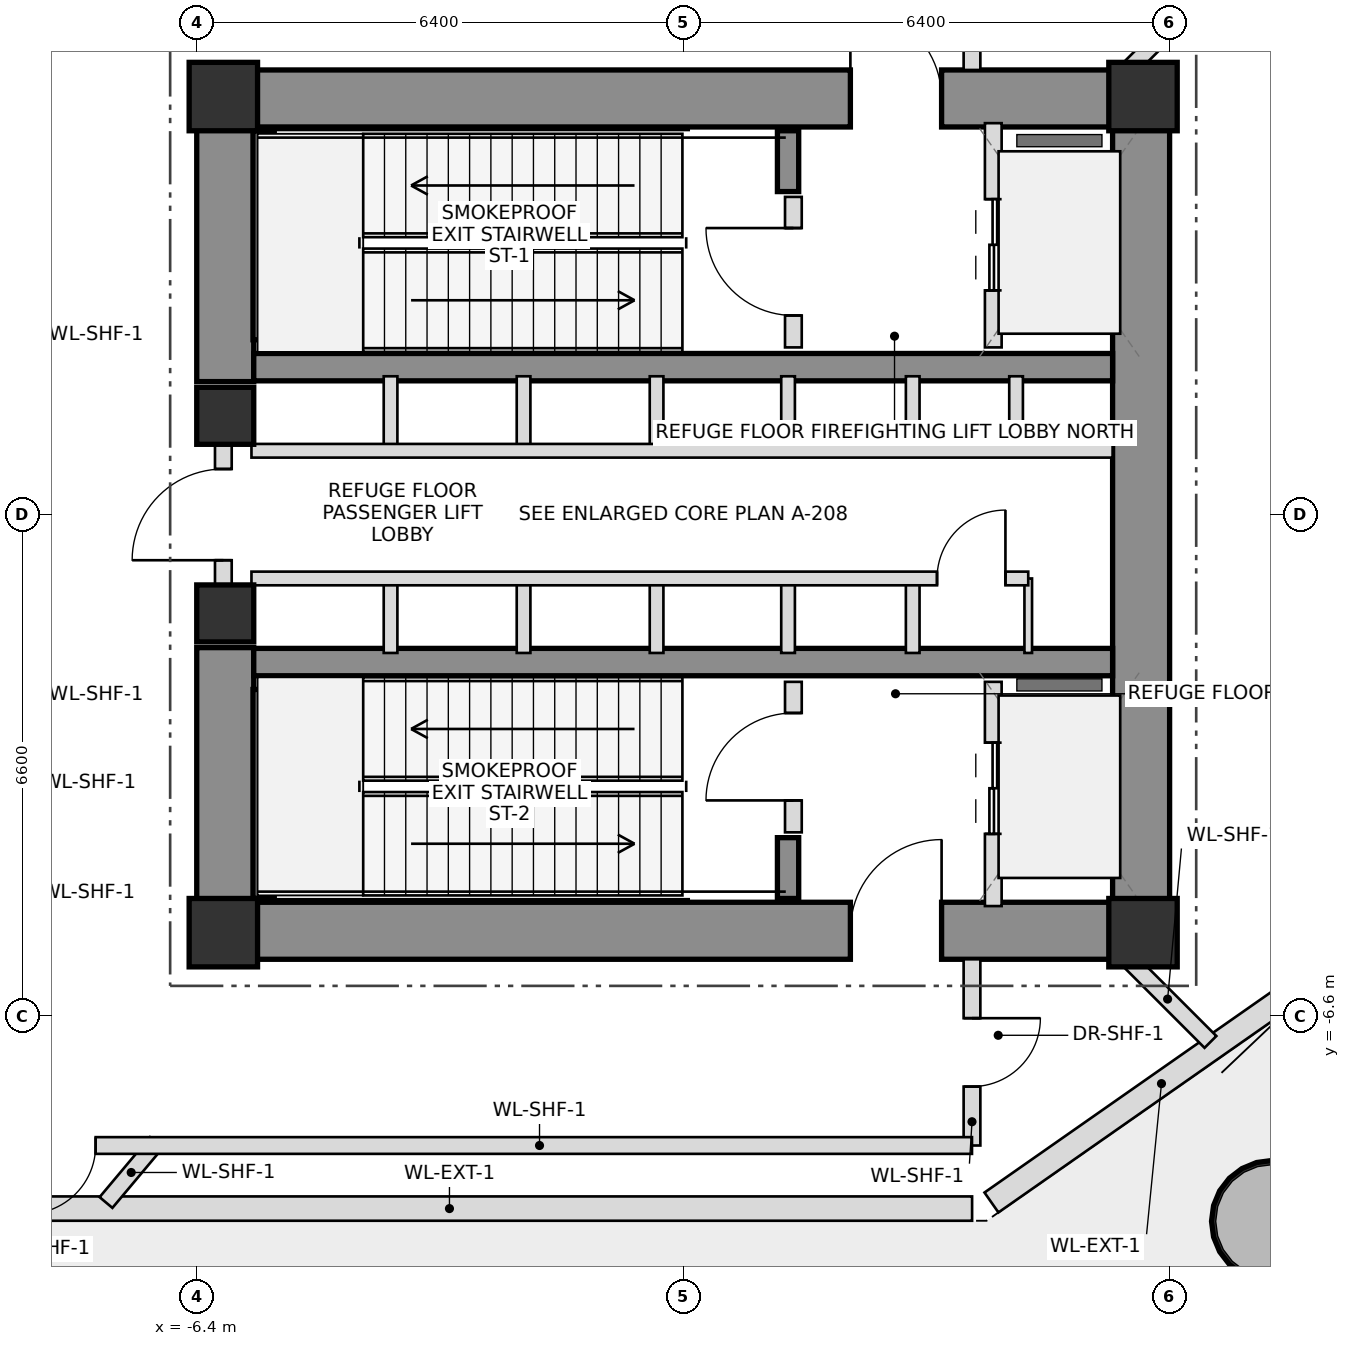
"""IFC4 building model, lengths in metres.
Left out: names, types, materials, properties, quantities, classifications, styles, units other than length and angle.
Written with IfcOpenShell. Run it as: python <this file> out.ifc"""

import sys

from ifc_helpers import new_model, si_unit, direction, frame, frame_2d, origin, origin_2d, place, context, subcontext, project, spatial, rectangle, hollow_circle, extrude, source, transform, mapped, element, fill, save


model = new_model("IFC4")
c1 = context("Model", 3, precision=1e-05, world=origin(), true_north=direction((0.0, 1.0)))
c2 = subcontext(c1, "Body", "Model", "MODEL_VIEW")
j1 = project(units=[si_unit("LENGTHUNIT", "METRE"), si_unit("PLANEANGLEUNIT", "RADIAN")], contexts=[c1])
p1 = place(None, origin())
s1 = spatial("IfcSite", under=j1, at=p1, CompositionType="ELEMENT")
p2 = place(p1, origin())
s2 = spatial("IfcBuilding", under=s1, at=p2, CompositionType="ELEMENT")
p3 = place(p2, frame((0.0, 0.0, 84.8)))
s3 = spatial("IfcBuildingStorey", under=s2, at=p3, CompositionType="ELEMENT", Elevation=84.8)
m1 = source(origin(), c2, "Body", "SweptSolid", [
    extrude(rectangle(XDim=0.9, YDim=0.9, at=origin_2d()), origin(), (0.0, 0.0, 1.0), 5.1),
])
for number, where, z_axis, x_axis in (
    (1, (-6.05, -5.5, 0.0), (0.0, 0.0, 1.0), (1.0, 0.0, 0.0)),
    (2, (6.05, -5.5, 0.0), (0.0, 0.0, 1.0), (1.0, 0.0, 0.0)),
    (3, (6.05, 5.5, 0.0), (0.0, 0.0, 1.0), (1.0, 0.0, 0.0)),
    (4, (-6.05, 5.5, 0.0), (0.0, 0.0, 1.0), (1.0, 0.0, 0.0)),
):
    element("IfcColumn", number, at=place(p3, frame(where, z_axis=z_axis, x_axis=x_axis)), inside=s3, PredefinedType="COLUMN", context=c2, shape_type="MappedRepresentation", body=[
        mapped(m1, transform((0.0, 0.0, 0.0), scale=1.0)),
    ])
p4 = place(p3, frame((-6.4, 5.475, 0.0), z_axis=(0.0, 0.0, 1.0), x_axis=(1.0, 0.0, 0.0)))
e5 = element("IfcWall", 5, at=p4, inside=s3, PredefinedType="SHEAR", context=c2, shape_type="SweptSolid", body=[
    extrude(rectangle(XDim=12.8, YDim=0.75, at=frame_2d((6.4, 0.0))), origin(), (0.0, 0.0, 1.0), 5.1),
])
p5 = place(p4, frame((8.6, 0.0, 0.0)))
e6 = element("IfcOpeningElement", 6, at=p5, cuts=e5, PredefinedType="OPENING", context=c2, shape_type="SweptSolid", body=[
    extrude(rectangle(XDim=1.2, YDim=2.2, at=frame_2d((0.6, 1.1))), frame((0.0, 0.385, 0.0), z_axis=(0.0, -1.0, 0.0), x_axis=(1.0, 0.0, 0.0)), (0.0, 0.0, 1.0), 0.77),
])
p6 = place(p3, frame((-6.4, -5.475, 0.0), z_axis=(0.0, 0.0, 1.0), x_axis=(1.0, 0.0, 0.0)))
e7 = element("IfcWall", 7, at=p6, inside=s3, PredefinedType="SHEAR", context=c2, shape_type="SweptSolid", body=[
    extrude(rectangle(XDim=12.8, YDim=0.75, at=frame_2d((6.4, 0.0))), origin(), (0.0, 0.0, 1.0), 5.1),
])
p7 = place(p6, frame((8.6, 0.0, 0.0)))
e8 = element("IfcOpeningElement", 8, at=p7, cuts=e7, PredefinedType="OPENING", context=c2, shape_type="SweptSolid", body=[
    extrude(rectangle(XDim=1.2, YDim=2.2, at=frame_2d((0.6, 1.1))), frame((0.0, 0.385, 0.0), z_axis=(0.0, -1.0, 0.0), x_axis=(1.0, 0.0, 0.0)), (0.0, 0.0, 1.0), 0.77),
])
p8 = place(p3, frame((6.025, -5.1, 0.0), z_axis=(0.0, 0.0, 1.0), x_axis=(0.0, 1.0, 0.0)))
e9 = element("IfcWall", 9, at=p8, inside=s3, PredefinedType="SHEAR", context=c2, shape_type="SweptSolid", body=[
    extrude(rectangle(XDim=10.2, YDim=0.75, at=frame_2d((5.1, 0.0))), origin(), (0.0, 0.0, 1.0), 5.1),
])
for number, where, z_axis, x_axis in (
    (10, (-6.025, -5.1, 0.0), (0.0, 0.0, 1.0), (0.0, 1.0, 0.0)),
    (11, (-6.025, 1.75, 0.0), (0.0, 0.0, 1.0), (0.0, 1.0, 0.0)),
):
    element("IfcWall", number, at=place(p3, frame(where, z_axis=z_axis, x_axis=x_axis)), inside=s3, PredefinedType="SHEAR", context=c2, shape_type="SweptSolid", body=[
        extrude(rectangle(XDim=3.35, YDim=0.75, at=frame_2d((1.675, 0.0))), origin(), (0.0, 0.0, 1.0), 5.1),
    ])
for number, where, z_axis, x_axis in (
    (12, (-5.65, 1.94, 0.0), (0.0, 0.0, 1.0), (1.0, 0.0, 0.0)),
    (13, (-5.65, -1.94, 0.0), (0.0, 0.0, 1.0), (1.0, 0.0, 0.0)),
):
    element("IfcWall", number, at=place(p3, frame(where, z_axis=z_axis, x_axis=x_axis)), inside=s3, PredefinedType="SHEAR", context=c2, shape_type="SweptSolid", body=[
        extrude(rectangle(XDim=11.3, YDim=0.36, at=frame_2d((5.65, 0.0))), origin(), (0.0, 0.0, 1.0), 5.1),
    ])
p9 = place(p3, frame((-5.52, 2.3, 0.0), z_axis=(0.0, 0.0, 1.0), x_axis=(0.0, 1.0, 0.0)))
e14 = element("IfcWall", 14, at=p9, inside=s3, PredefinedType="SHEAR", context=c2, shape_type="SweptSolid", body=[
    extrude(rectangle(XDim=2.75, YDim=0.28, at=frame_2d((1.375, 0.0))), origin(), (0.0, 0.0, 1.0), 5.1),
])
p10 = place(p3, frame((1.38, 4.25, 0.0), z_axis=(0.0, 0.0, 1.0), x_axis=(0.0, 1.0, 0.0)))
e15 = element("IfcWall", 15, at=p10, inside=s3, PredefinedType="SHEAR", context=c2, shape_type="SweptSolid", body=[
    extrude(rectangle(XDim=0.8, YDim=0.28, at=frame_2d((0.4, 0.0))), origin(), (0.0, 0.0, 1.0), 5.1),
])
p11 = place(p3, frame((-5.52, -5.05, 0.0), z_axis=(0.0, 0.0, 1.0), x_axis=(0.0, 1.0, 0.0)))
e16 = element("IfcWall", 16, at=p11, inside=s3, PredefinedType="SHEAR", context=c2, shape_type="SweptSolid", body=[
    extrude(rectangle(XDim=2.75, YDim=0.28, at=frame_2d((1.375, 0.0))), origin(), (0.0, 0.0, 1.0), 5.1),
])
p12 = place(p3, frame((1.38, -5.05, 0.0), z_axis=(0.0, 0.0, 1.0), x_axis=(0.0, 1.0, 0.0)))
e17 = element("IfcWall", 17, at=p12, inside=s3, PredefinedType="SHEAR", context=c2, shape_type="SweptSolid", body=[
    extrude(rectangle(XDim=0.8, YDim=0.28, at=frame_2d((0.4, 0.0))), origin(), (0.0, 0.0, 1.0), 5.1),
])
m2 = source(origin(), c2, "Body", "SweptSolid", [
    extrude(rectangle(XDim=0.75, YDim=0.75, at=origin_2d()), origin(), (0.0, 0.0, 1.0), 5.1),
])
for number, where, z_axis, x_axis in (
    (18, (-6.025, -1.3, 0.0), (0.0, 0.0, 1.0), (1.0, 0.0, 0.0)),
    (19, (-6.025, 1.3, 0.0), (0.0, 0.0, 1.0), (1.0, 0.0, 0.0)),
):
    element("IfcColumn", number, at=place(p3, frame(where, z_axis=z_axis, x_axis=x_axis)), inside=s3, PredefinedType="COLUMN", context=c2, shape_type="MappedRepresentation", body=[
        mapped(m2, transform((0.0, 0.0, 0.0), scale=1.0)),
    ])
m3 = source(origin(), c2, "Body", "SweptSolid", [
    extrude(hollow_circle(Radius=0.8, WallThickness=0.055, at=origin_2d()), origin(), (0.0, 0.0, 1.0), 5.0),
])
p13 = place(p3, frame((7.752, -9.297, 0.0), z_axis=(0.0, 0.0, 1.0), x_axis=(1.0, 0.0, 0.0)))
e20 = element("IfcColumn", 20, at=p13, inside=s3, PredefinedType="COLUMN", context=c2, shape_type="MappedRepresentation", body=[
    mapped(m3, transform((0.0, 0.0, 0.0), scale=1.0)),
])
p14 = place(p3, frame((-6.05, -0.95, 0.0), z_axis=(0.0, 0.0, 1.0), x_axis=(0.0, 1.0, 0.0)))
e21 = element("IfcWall", 21, at=p14, inside=s3, PredefinedType="PLUMBINGWALL", context=c2, shape_type="SweptSolid", body=[
    extrude(rectangle(XDim=1.9, YDim=0.22, at=frame_2d((0.95, 0.0))), origin(), (0.0, 0.0, 1.0), 3.875),
])
p15 = place(p14, frame((0.35, 0.0, 0.0)))
e22 = element("IfcOpeningElement", 22, at=p15, cuts=e21, PredefinedType="OPENING", context=c2, shape_type="SweptSolid", body=[
    extrude(rectangle(XDim=1.2, YDim=2.2, at=frame_2d((0.6, 1.1))), frame((0.0, 0.12, 0.0), z_axis=(0.0, -1.0, 0.0), x_axis=(1.0, 0.0, 0.0)), (0.0, 0.0, 1.0), 0.24),
])
p16 = place(p3, frame((1.45, 2.2, 0.0), z_axis=(0.0, 0.0, 1.0), x_axis=(0.0, 1.0, 0.0)))
e23 = element("IfcWall", 23, at=p16, inside=s3, PredefinedType="PLUMBINGWALL", context=c2, shape_type="SweptSolid", body=[
    extrude(rectangle(XDim=1.98, YDim=0.22, at=frame_2d((0.99, 0.0))), origin(), (0.0, 0.0, 1.0), 4.895),
])
p17 = place(p16, frame((0.42, 0.0, 0.0)))
e24 = element("IfcOpeningElement", 24, at=p17, cuts=e23, PredefinedType="OPENING", context=c2, shape_type="SweptSolid", body=[
    extrude(rectangle(XDim=1.15, YDim=2.15, at=frame_2d((0.575, 1.075))), frame((0.0, 0.12, 0.0), z_axis=(0.0, -1.0, 0.0), x_axis=(1.0, 0.0, 0.0)), (0.0, 0.0, 1.0), 0.24),
])
p18 = place(p3, frame((4.08, 2.2, 0.0), z_axis=(0.0, 0.0, 1.0), x_axis=(0.0, 1.0, 0.0)))
e25 = element("IfcWall", 25, at=p18, inside=s3, PredefinedType="PLUMBINGWALL", context=c2, shape_type="SweptSolid", body=[
    extrude(rectangle(XDim=2.95, YDim=0.22, at=frame_2d((1.475, 0.0))), origin(), (0.0, 0.0, 1.0), 4.895),
])
p19 = place(p18, frame((0.75, 0.0, 0.0)))
e26 = element("IfcOpeningElement", 26, at=p19, cuts=e25, PredefinedType="OPENING", context=c2, shape_type="SweptSolid", body=[
    extrude(rectangle(XDim=1.2, YDim=2.25, at=frame_2d((0.6, 1.125))), frame((0.0, 0.12, 0.0), z_axis=(0.0, -1.0, 0.0), x_axis=(1.0, 0.0, 0.0)), (0.0, 0.0, 1.0), 0.24),
])
p20 = place(p3, frame((1.45, -4.18, 0.0), z_axis=(0.0, 0.0, 1.0), x_axis=(0.0, 1.0, 0.0)))
e27 = element("IfcWall", 27, at=p20, inside=s3, PredefinedType="PLUMBINGWALL", context=c2, shape_type="SweptSolid", body=[
    extrude(rectangle(XDim=1.98, YDim=0.22, at=frame_2d((0.99, 0.0))), origin(), (0.0, 0.0, 1.0), 4.895),
])
p21 = place(p20, frame((0.42, 0.0, 0.0)))
e28 = element("IfcOpeningElement", 28, at=p21, cuts=e27, PredefinedType="OPENING", context=c2, shape_type="SweptSolid", body=[
    extrude(rectangle(XDim=1.15, YDim=2.15, at=frame_2d((0.575, 1.075))), frame((0.0, 0.12, 0.0), z_axis=(0.0, -1.0, 0.0), x_axis=(1.0, 0.0, 0.0)), (0.0, 0.0, 1.0), 0.24),
])
p22 = place(p3, frame((4.08, -5.15, 0.0), z_axis=(0.0, 0.0, 1.0), x_axis=(0.0, 1.0, 0.0)))
e29 = element("IfcWall", 29, at=p22, inside=s3, PredefinedType="PLUMBINGWALL", context=c2, shape_type="SweptSolid", body=[
    extrude(rectangle(XDim=2.95, YDim=0.22, at=frame_2d((1.475, 0.0))), origin(), (0.0, 0.0, 1.0), 4.895),
])
p23 = place(p22, frame((0.95, 0.0, 0.0)))
e30 = element("IfcOpeningElement", 30, at=p23, cuts=e29, PredefinedType="OPENING", context=c2, shape_type="SweptSolid", body=[
    extrude(rectangle(XDim=1.2, YDim=2.25, at=frame_2d((0.6, 1.125))), frame((0.0, 0.12, 0.0), z_axis=(0.0, -1.0, 0.0), x_axis=(1.0, 0.0, 0.0)), (0.0, 0.0, 1.0), 0.24),
])
for number, where, z_axis, x_axis in (
    (31, (-3.85, 0.84, 0.0), (0.0, 0.0, 1.0), (0.0, 1.0, 0.0)),
    (32, (-3.85, -1.82, 0.0), (0.0, 0.0, 1.0), (0.0, 1.0, 0.0)),
    (33, (-2.1, 0.84, 0.0), (0.0, 0.0, 1.0), (0.0, 1.0, 0.0)),
    (34, (-2.1, -1.82, 0.0), (0.0, 0.0, 1.0), (0.0, 1.0, 0.0)),
    (35, (-0.35, 0.84, 0.0), (0.0, 0.0, 1.0), (0.0, 1.0, 0.0)),
    (36, (-0.35, -1.82, 0.0), (0.0, 0.0, 1.0), (0.0, 1.0, 0.0)),
    (37, (1.38, 0.84, 0.0), (0.0, 0.0, 1.0), (0.0, 1.0, 0.0)),
    (38, (1.38, -1.82, 0.0), (0.0, 0.0, 1.0), (0.0, 1.0, 0.0)),
    (39, (3.02, 0.84, 0.0), (0.0, 0.0, 1.0), (0.0, 1.0, 0.0)),
    (40, (4.38, 0.84, 0.0), (0.0, 0.0, 1.0), (0.0, 1.0, 0.0)),
    (41, (3.02, -1.82, 0.0), (0.0, 0.0, 1.0), (0.0, 1.0, 0.0)),
):
    element("IfcWall", number, at=place(p3, frame(where, z_axis=z_axis, x_axis=x_axis)), inside=s3, PredefinedType="PLUMBINGWALL", context=c2, shape_type="SweptSolid", body=[
        extrude(rectangle(XDim=0.98, YDim=0.18, at=frame_2d((0.49, 0.0))), origin(), (0.0, 0.0, 1.0), 4.895),
    ])
p24 = place(p3, frame((4.54, -1.82, 0.0), z_axis=(0.0, 0.0, 1.0), x_axis=(0.0, 1.0, 0.0)))
e42 = element("IfcWall", 42, at=p24, inside=s3, PredefinedType="PARTITIONING", context=c2, shape_type="SweptSolid", body=[
    extrude(rectangle(XDim=0.98, YDim=0.1, at=frame_2d((0.49, 0.0))), origin(), (0.0, 0.0, 1.0), 4.895),
])
p25 = place(p3, frame((-5.68, 0.84, 0.0), z_axis=(0.0, 0.0, 1.0), x_axis=(1.0, 0.0, 0.0)))
e43 = element("IfcWall", 43, at=p25, inside=s3, PredefinedType="PLUMBINGWALL", context=c2, shape_type="SweptSolid", body=[
    extrude(rectangle(XDim=11.33, YDim=0.18, at=frame_2d((5.665, 0.0))), origin(), (0.0, 0.0, 1.0), 4.895),
])
p26 = place(p3, frame((-5.68, -0.84, 0.0), z_axis=(0.0, 0.0, 1.0), x_axis=(1.0, 0.0, 0.0)))
e44 = element("IfcWall", 44, at=p26, inside=s3, PredefinedType="PLUMBINGWALL", context=c2, shape_type="SweptSolid", body=[
    extrude(rectangle(XDim=10.22, YDim=0.18, at=frame_2d((5.11, 0.0))), origin(), (0.0, 0.0, 1.0), 4.895),
])
p27 = place(p26, frame((9.02, 0.0, 0.0)))
e45 = element("IfcOpeningElement", 45, at=p27, cuts=e44, PredefinedType="OPENING", context=c2, shape_type="SweptSolid", body=[
    extrude(rectangle(XDim=0.9, YDim=2.05, at=frame_2d((0.45, 1.025))), frame((0.0, 0.1, 0.0), z_axis=(0.0, -1.0, 0.0), x_axis=(1.0, 0.0, 0.0)), (0.0, 0.0, 1.0), 0.2),
])
p28 = place(p3, frame((8.53, -5.922, 0.0), z_axis=(0.0, 0.0, 1.0), x_axis=(-0.819536456939, -0.573027046262, 0.0)))
e46 = element("IfcWall", 46, at=p28, inside=s3, PredefinedType="SOLIDWALL", context=c2, shape_type="SweptSolid", body=[
    extrude(rectangle(XDim=5.459, YDim=0.32, at=frame_2d((2.729, 0.0))), origin(), (0.0, 0.0, 1.0), 3.55),
])
p29 = place(p3, frame((3.801, -9.13, 0.0), z_axis=(0.0, 0.0, 1.0), x_axis=(-1.0, 0.0, 0.0)))
e47 = element("IfcWall", 47, at=p29, inside=s3, PredefinedType="SOLIDWALL", context=c2, shape_type="SweptSolid", body=[
    extrude(rectangle(XDim=13.753, YDim=0.32, at=frame_2d((6.876, 0.0))), origin(), (0.0, 0.0, 1.0), 4.895),
])
p30 = place(p3, frame((5.81, 5.81, 0.0), z_axis=(0.0, 0.0, 1.0), x_axis=(0.707106781187, 0.707106781187, 0.0)))
e48 = element("IfcWall", 48, at=p30, inside=s3, PredefinedType="PLUMBINGWALL", context=c2, shape_type="SweptSolid", body=[
    extrude(rectangle(XDim=2.63, YDim=0.22, at=frame_2d((1.315, 0.0))), origin(), (0.0, 0.0, 1.0), 3.55),
])
p31 = place(p3, frame((-6.931, -8.26, 0.0), z_axis=(0.0, 0.0, 1.0), x_axis=(-0.642881168458, -0.765965928251, 0.0)))
e49 = element("IfcWall", 49, at=p31, inside=s3, PredefinedType="PLUMBINGWALL", context=c2, shape_type="SweptSolid", body=[
    extrude(rectangle(XDim=1.031, YDim=0.22, at=frame_2d((0.516, 0.0))), origin(), (0.0, 0.0, 1.0), 4.895),
])
p32 = place(p3, frame((5.81, -5.81, 0.0), z_axis=(0.0, 0.0, 1.0), x_axis=(0.707106781187, -0.707106781187, 0.0)))
e50 = element("IfcWall", 50, at=p32, inside=s3, PredefinedType="PLUMBINGWALL", context=c2, shape_type="SweptSolid", body=[
    extrude(rectangle(XDim=1.594, YDim=0.22, at=frame_2d((0.797, 0.0))), origin(), (0.0, 0.0, 1.0), 3.55),
])
p33 = place(p3, frame((3.8, -5.85, 0.0), z_axis=(0.0, 0.0, 1.0), x_axis=(0.0, -1.0, 0.0)))
e51 = element("IfcWall", 51, at=p33, inside=s3, PredefinedType="PLUMBINGWALL", context=c2, shape_type="SweptSolid", body=[
    extrude(rectangle(XDim=2.45, YDim=0.22, at=frame_2d((1.225, 0.0))), origin(), (0.0, 0.0, 1.0), 4.895),
])
p34 = place(p33, frame((0.775, 0.0, 0.0)))
e52 = element("IfcOpeningElement", 52, at=p34, cuts=e51, PredefinedType="OPENING", context=c2, shape_type="SweptSolid", body=[
    extrude(rectangle(XDim=0.9, YDim=2.05, at=frame_2d((0.45, 1.025))), frame((0.0, 0.12, 0.0), z_axis=(0.0, -1.0, 0.0), x_axis=(1.0, 0.0, 0.0)), (0.0, 0.0, 1.0), 0.24),
])
p35 = place(p3, frame((3.8, -8.3, 0.0), z_axis=(0.0, 0.0, 1.0), x_axis=(-1.0, 0.0, 0.0)))
e53 = element("IfcWall", 53, at=p35, inside=s3, PredefinedType="PLUMBINGWALL", context=c2, shape_type="SweptSolid", body=[
    extrude(rectangle(XDim=12.65, YDim=0.22, at=frame_2d((6.325, 0.0))), origin(), (0.0, 0.0, 1.0), 4.895),
])
p36 = place(p35, frame((11.53, 0.0, 0.0)))
e54 = element("IfcOpeningElement", 54, at=p36, cuts=e53, PredefinedType="OPENING", context=c2, shape_type="SweptSolid", body=[
    extrude(rectangle(XDim=0.9, YDim=2.05, at=frame_2d((0.45, 1.025))), frame((0.0, 0.12, 0.0), z_axis=(0.0, -1.0, 0.0), x_axis=(1.0, 0.0, 0.0)), (0.0, 0.0, 1.0), 0.24),
])
p37 = place(p3, frame((3.8, 8.3, 0.0), z_axis=(0.0, 0.0, 1.0), x_axis=(0.0, -1.0, 0.0)))
e55 = element("IfcWall", 55, at=p37, inside=s3, PredefinedType="PLUMBINGWALL", context=c2, shape_type="SweptSolid", body=[
    extrude(rectangle(XDim=2.45, YDim=0.22, at=frame_2d((1.225, 0.0))), origin(), (0.0, 0.0, 1.0), 4.895),
])
p38 = place(p5, origin())
e56 = element("IfcDoor", 56, at=p38, inside=s3, OperationType="SINGLE_SWING_LEFT", PredefinedType="DOOR", context=c2, shape_type="SweptSolid", body=[
    extrude(rectangle(XDim=1.2, YDim=2.2, at=frame_2d((0.6, 1.1))), frame((0.0, 0.025, 0.0), z_axis=(0.0, -1.0, 0.0), x_axis=(1.0, 0.0, 0.0)), (0.0, 0.0, 1.0), 0.05),
])
fill(e6, e56)
p39 = place(p7, origin())
e57 = element("IfcDoor", 57, at=p39, inside=s3, OperationType="SINGLE_SWING_RIGHT", PredefinedType="DOOR", context=c2, shape_type="SweptSolid", body=[
    extrude(rectangle(XDim=1.2, YDim=2.2, at=frame_2d((0.6, 1.1))), frame((0.0, 0.025, 0.0), z_axis=(0.0, -1.0, 0.0), x_axis=(1.0, 0.0, 0.0)), (0.0, 0.0, 1.0), 0.05),
])
fill(e8, e57)
p40 = place(p15, origin())
e58 = element("IfcDoor", 58, at=p40, inside=s3, OperationType="SINGLE_SWING_LEFT", PredefinedType="DOOR", context=c2, shape_type="SweptSolid", body=[
    extrude(rectangle(XDim=1.2, YDim=2.2, at=frame_2d((0.6, 1.1))), frame((0.0, 0.025, 0.0), z_axis=(0.0, -1.0, 0.0), x_axis=(1.0, 0.0, 0.0)), (0.0, 0.0, 1.0), 0.05),
])
fill(e22, e58)
p41 = place(p17, origin())
e59 = element("IfcDoor", 59, at=p41, inside=s3, OperationType="SINGLE_SWING_RIGHT", PredefinedType="DOOR", context=c2, shape_type="SweptSolid", body=[
    extrude(rectangle(XDim=1.15, YDim=2.15, at=frame_2d((0.575, 1.075))), frame((0.0, 0.025, 0.0), z_axis=(0.0, -1.0, 0.0), x_axis=(1.0, 0.0, 0.0)), (0.0, 0.0, 1.0), 0.05),
])
fill(e24, e59)
p42 = place(p19, origin())
e60 = element("IfcDoor", 60, at=p42, inside=s3, OperationType="DOUBLE_DOOR_SLIDING", PredefinedType="DOOR", context=c2, shape_type="SweptSolid", body=[
    extrude(rectangle(XDim=1.2, YDim=2.25, at=frame_2d((0.6, 1.125))), frame((0.0, 0.025, 0.0), z_axis=(0.0, -1.0, 0.0), x_axis=(1.0, 0.0, 0.0)), (0.0, 0.0, 1.0), 0.05),
])
fill(e26, e60)
p43 = place(p21, origin())
e61 = element("IfcDoor", 61, at=p43, inside=s3, OperationType="SINGLE_SWING_LEFT", PredefinedType="DOOR", context=c2, shape_type="SweptSolid", body=[
    extrude(rectangle(XDim=1.15, YDim=2.15, at=frame_2d((0.575, 1.075))), frame((0.0, 0.025, 0.0), z_axis=(0.0, -1.0, 0.0), x_axis=(1.0, 0.0, 0.0)), (0.0, 0.0, 1.0), 0.05),
])
fill(e28, e61)
p44 = place(p23, origin())
e62 = element("IfcDoor", 62, at=p44, inside=s3, OperationType="DOUBLE_DOOR_SLIDING", PredefinedType="DOOR", context=c2, shape_type="SweptSolid", body=[
    extrude(rectangle(XDim=1.2, YDim=2.25, at=frame_2d((0.6, 1.125))), frame((0.0, 0.025, 0.0), z_axis=(0.0, -1.0, 0.0), x_axis=(1.0, 0.0, 0.0)), (0.0, 0.0, 1.0), 0.05),
])
fill(e30, e62)
p45 = place(p27, origin())
e63 = element("IfcDoor", 63, at=p45, inside=s3, OperationType="SINGLE_SWING_RIGHT", PredefinedType="DOOR", context=c2, shape_type="SweptSolid", body=[
    extrude(rectangle(XDim=0.9, YDim=2.05, at=frame_2d((0.45, 1.025))), frame((0.0, 0.025, 0.0), z_axis=(0.0, -1.0, 0.0), x_axis=(1.0, 0.0, 0.0)), (0.0, 0.0, 1.0), 0.05),
])
fill(e45, e63)
p46 = place(p34, origin())
e64 = element("IfcDoor", 64, at=p46, inside=s3, OperationType="SINGLE_SWING_LEFT", PredefinedType="DOOR", context=c2, shape_type="SweptSolid", body=[
    extrude(rectangle(XDim=0.9, YDim=2.05, at=frame_2d((0.45, 1.025))), frame((0.0, 0.025, 0.0), z_axis=(0.0, -1.0, 0.0), x_axis=(1.0, 0.0, 0.0)), (0.0, 0.0, 1.0), 0.05),
])
fill(e52, e64)
p47 = place(p36, origin())
e65 = element("IfcDoor", 65, at=p47, inside=s3, OperationType="SINGLE_SWING_RIGHT", PredefinedType="DOOR", context=c2, shape_type="SweptSolid", body=[
    extrude(rectangle(XDim=0.9, YDim=2.05, at=frame_2d((0.45, 1.025))), frame((0.0, 0.025, 0.0), z_axis=(0.0, -1.0, 0.0), x_axis=(1.0, 0.0, 0.0)), (0.0, 0.0, 1.0), 0.05),
])
fill(e54, e65)
save(model, sys.argv[1])
